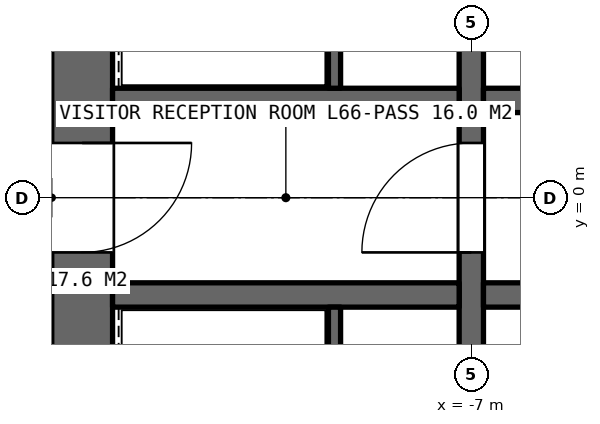
"""IFC4 building model, lengths in metres.
Left out: names, types, materials, properties, quantities, classifications, styles, units other than length and angle.
Written with IfcOpenShell. Run it as: python <this file> out.ifc"""

import sys

from ifc_helpers import new_model, si_unit, direction, frame, frame_2d, origin, place, context, subcontext, project, spatial, rectangle, extrude, element, fill, save


model = new_model("IFC4")
c1 = context("Model", 3, precision=1e-05, world=origin(), true_north=direction((0.0, 1.0)))
c2 = subcontext(c1, "Body", "Model", "MODEL_VIEW")
j1 = project(units=[si_unit("LENGTHUNIT", "METRE"), si_unit("PLANEANGLEUNIT", "RADIAN")], contexts=[c1])
p1 = place(None, origin())
s1 = spatial("IfcSite", under=j1, at=p1, CompositionType="ELEMENT")
p2 = place(p1, origin())
s2 = spatial("IfcBuilding", under=s1, at=p2, CompositionType="ELEMENT")
p3 = place(p2, frame((0.0, 0.0, 296.4)))
s3 = spatial("IfcBuildingStorey", under=s2, at=p3, CompositionType="ELEMENT", Elevation=296.4)
p4 = place(p3, frame((-13.4, 8.9, 0.0), z_axis=(0.0, 0.0, 1.0), x_axis=(0.0, -1.0, 0.0)))
e1 = element("IfcWall", 1, at=p4, inside=s3, PredefinedType="SHEAR", context=c2, shape_type="SweptSolid", body=[
    extrude(rectangle(XDim=17.8, YDim=1.0, at=frame_2d((8.9, 0.0))), origin(), (0.0, 0.0, 1.0), 4.2),
])
p5 = place(p4, frame((8.0, 0.0, 0.0)))
e2 = element("IfcOpeningElement", 2, at=p5, cuts=e1, PredefinedType="OPENING", context=c2, shape_type="SweptSolid", body=[
    extrude(rectangle(XDim=1.8, YDim=2.4, at=frame_2d((0.9, 1.2))), frame((0.0, 0.51, 0.0), z_axis=(0.0, -1.0, 0.0), x_axis=(1.0, 0.0, 0.0)), (0.0, 0.0, 1.0), 1.02),
])
p6 = place(p4, frame((16.6, 0.0, 0.0)))
e3 = element("IfcOpeningElement", 3, at=p6, cuts=e1, PredefinedType="OPENING", context=c2, shape_type="SweptSolid", body=[
    extrude(rectangle(XDim=1.0, YDim=2.4, at=frame_2d((0.5, 1.2))), frame((0.0, 0.51, 0.0), z_axis=(0.0, -1.0, 0.0), x_axis=(1.0, 0.0, 0.0)), (0.0, 0.0, 1.0), 1.02),
])
p7 = place(p3, frame((-7.0, -8.9, 0.0), z_axis=(0.0, 0.0, 1.0), x_axis=(0.0, 1.0, 0.0)))
e4 = element("IfcWall", 4, at=p7, inside=s3, PredefinedType="SHEAR", context=c2, shape_type="SweptSolid", body=[
    extrude(rectangle(XDim=17.8, YDim=0.4, at=frame_2d((8.9, 0.0))), origin(), (0.0, 0.0, 1.0), 4.2),
])
p8 = place(p7, frame((8.0, 0.0, 0.0)))
e5 = element("IfcOpeningElement", 5, at=p8, cuts=e4, PredefinedType="OPENING", context=c2, shape_type="SweptSolid", body=[
    extrude(rectangle(XDim=1.8, YDim=2.4, at=frame_2d((0.9, 1.2))), frame((0.0, 0.21, 0.0), z_axis=(0.0, -1.0, 0.0), x_axis=(1.0, 0.0, 0.0)), (0.0, 0.0, 1.0), 0.42),
])
p9 = place(p3, frame((-6.8, 1.6, 0.0), z_axis=(0.0, 0.0, 1.0), x_axis=(1.0, 0.0, 0.0)))
e6 = element("IfcWall", 6, at=p9, inside=s3, PredefinedType="SHEAR", context=c2, shape_type="SweptSolid", body=[
    extrude(rectangle(XDim=13.6, YDim=0.4, at=frame_2d((6.8, 0.0))), origin(), (0.0, 0.0, 1.0), 4.2),
])
p10 = place(p9, frame((1.265, 0.0, 0.0)))
e7 = element("IfcOpeningElement", 7, at=p10, cuts=e6, PredefinedType="OPENING", context=c2, shape_type="SweptSolid", body=[
    extrude(rectangle(XDim=1.0, YDim=2.4, at=frame_2d((0.5, 1.2))), frame((0.0, 0.21, 0.0), z_axis=(0.0, -1.0, 0.0), x_axis=(1.0, 0.0, 0.0)), (0.0, 0.0, 1.0), 0.42),
])
p11 = place(p9, frame((4.0, 0.0, 0.0)))
e8 = element("IfcOpeningElement", 8, at=p11, cuts=e6, PredefinedType="OPENING", context=c2, shape_type="SweptSolid", body=[
    extrude(rectangle(XDim=1.0, YDim=2.4, at=frame_2d((0.5, 1.2))), frame((0.0, 0.21, 0.0), z_axis=(0.0, -1.0, 0.0), x_axis=(1.0, 0.0, 0.0)), (0.0, 0.0, 1.0), 0.42),
])
p12 = place(p9, frame((7.635, 0.0, 0.0)))
e9 = element("IfcOpeningElement", 9, at=p12, cuts=e6, PredefinedType="OPENING", context=c2, shape_type="SweptSolid", body=[
    extrude(rectangle(XDim=1.0, YDim=2.4, at=frame_2d((0.5, 1.2))), frame((0.0, 0.21, 0.0), z_axis=(0.0, -1.0, 0.0), x_axis=(1.0, 0.0, 0.0)), (0.0, 0.0, 1.0), 0.42),
])
p13 = place(p9, frame((11.9, 0.0, 0.0)))
e10 = element("IfcOpeningElement", 10, at=p13, cuts=e6, PredefinedType="OPENING", context=c2, shape_type="SweptSolid", body=[
    extrude(rectangle(XDim=1.0, YDim=2.4, at=frame_2d((0.5, 1.2))), frame((0.0, 0.21, 0.0), z_axis=(0.0, -1.0, 0.0), x_axis=(1.0, 0.0, 0.0)), (0.0, 0.0, 1.0), 0.42),
])
p14 = place(p3, frame((-6.8, -1.6, 0.0), z_axis=(0.0, 0.0, 1.0), x_axis=(1.0, 0.0, 0.0)))
e11 = element("IfcWall", 11, at=p14, inside=s3, PredefinedType="SHEAR", context=c2, shape_type="SweptSolid", body=[
    extrude(rectangle(XDim=13.6, YDim=0.4, at=frame_2d((6.8, 0.0))), origin(), (0.0, 0.0, 1.0), 4.2),
])
p15 = place(p14, frame((11.9, 0.0, 0.0)))
e12 = element("IfcOpeningElement", 12, at=p15, cuts=e11, PredefinedType="OPENING", context=c2, shape_type="SweptSolid", body=[
    extrude(rectangle(XDim=1.0, YDim=2.4, at=frame_2d((0.5, 1.2))), frame((0.0, 0.21, 0.0), z_axis=(0.0, -1.0, 0.0), x_axis=(1.0, 0.0, 0.0)), (0.0, 0.0, 1.0), 0.42),
])
p16 = place(p14, frame((4.5, 0.0, 0.0)))
e13 = element("IfcOpeningElement", 13, at=p16, cuts=e11, PredefinedType="OPENING", context=c2, shape_type="SweptSolid", body=[
    extrude(rectangle(XDim=1.8, YDim=2.4, at=frame_2d((0.9, 1.2))), frame((0.0, 0.21, 0.0), z_axis=(0.0, -1.0, 0.0), x_axis=(1.0, 0.0, 0.0)), (0.0, 0.0, 1.0), 0.42),
])
for number, where, z_axis, x_axis in (
    (14, (-12.9, 1.6, 0.0), (0.0, 0.0, 1.0), (1.0, 0.0, 0.0)),
    (15, (-12.9, -1.6, 0.0), (0.0, 0.0, 1.0), (1.0, 0.0, 0.0)),
):
    element("IfcWall", number, at=place(p3, frame(where, z_axis=z_axis, x_axis=x_axis)), inside=s3, PredefinedType="SHEAR", context=c2, shape_type="SweptSolid", body=[
        extrude(rectangle(XDim=5.7, YDim=0.4, at=frame_2d((2.85, 0.0))), origin(), (0.0, 0.0, 1.0), 4.2),
    ])
for number, where, z_axis, x_axis in (
    (16, (-9.25, 7.2, 0.0), (0.0, 0.0, 1.0), (0.0, -1.0, 0.0)),
    (17, (-9.25, -7.2, 0.0), (0.0, 0.0, 1.0), (0.0, 1.0, 0.0)),
):
    element("IfcWall", number, at=place(p3, frame(where, z_axis=z_axis, x_axis=x_axis)), inside=s3, PredefinedType="SOLIDWALL", context=c2, shape_type="SweptSolid", body=[
        extrude(rectangle(XDim=5.4, YDim=0.2, at=frame_2d((2.7, 0.0))), origin(), (0.0, 0.0, 1.0), 4.2),
    ])
p17 = place(p5, origin())
e18 = element("IfcDoor", 18, at=p17, inside=s3, OperationType="DOUBLE_DOOR_SINGLE_SWING", PredefinedType="DOOR", context=c2, shape_type="SweptSolid", body=[
    extrude(rectangle(XDim=1.8, YDim=2.4, at=frame_2d((0.9, 1.2))), frame((0.0, 0.025, 0.0), z_axis=(0.0, -1.0, 0.0), x_axis=(1.0, 0.0, 0.0)), (0.0, 0.0, 1.0), 0.05),
])
fill(e2, e18)
p18 = place(p8, origin())
e19 = element("IfcDoor", 19, at=p18, inside=s3, OperationType="DOUBLE_DOOR_SINGLE_SWING", PredefinedType="DOOR", context=c2, shape_type="SweptSolid", body=[
    extrude(rectangle(XDim=1.8, YDim=2.4, at=frame_2d((0.9, 1.2))), frame((0.0, 0.025, 0.0), z_axis=(0.0, -1.0, 0.0), x_axis=(1.0, 0.0, 0.0)), (0.0, 0.0, 1.0), 0.05),
])
fill(e5, e19)
save(model, sys.argv[1])
